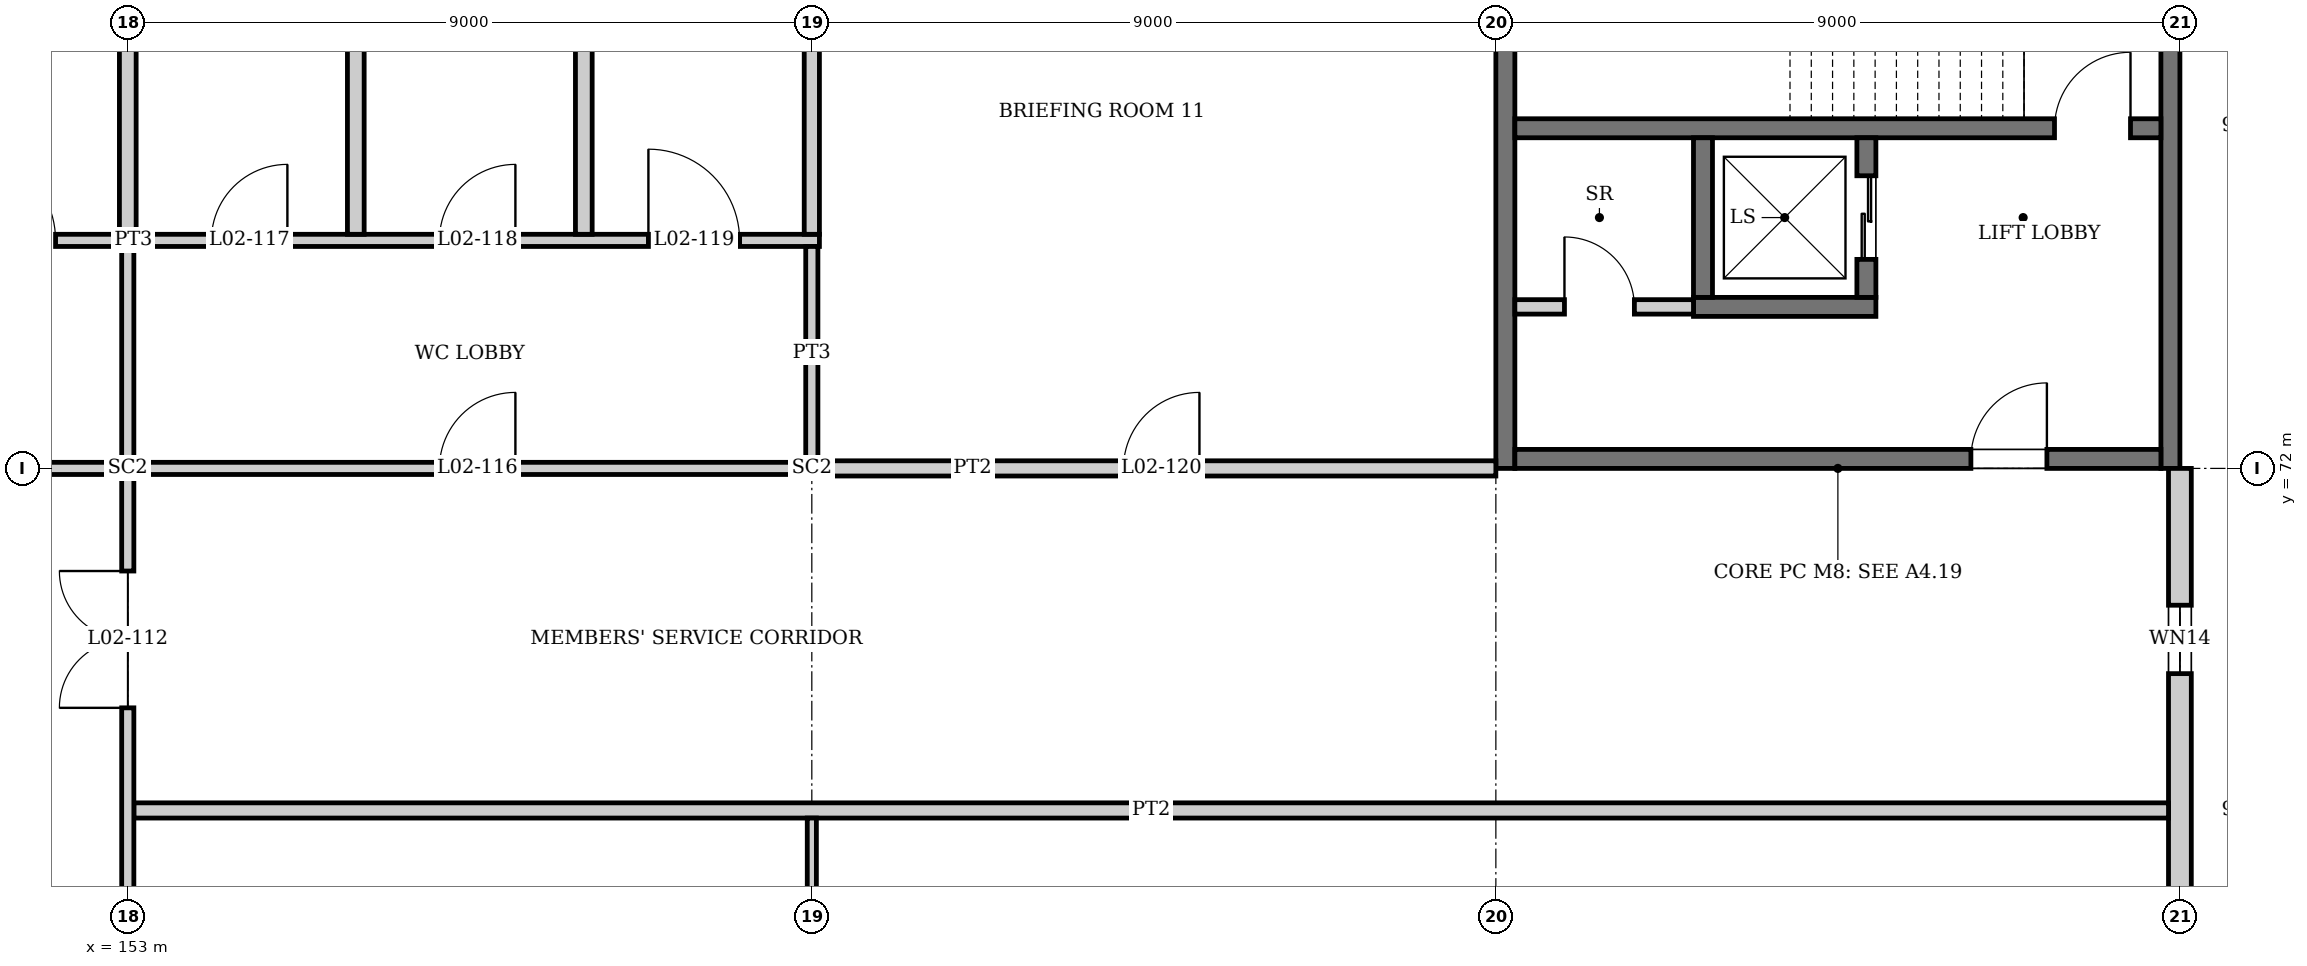
"""IFC4 building model, lengths in metres.
Left out: names, types, materials, properties, quantities, classifications, styles, units other than length and angle.
Written with IfcOpenShell. Run it as: python <this file> out.ifc"""

import sys

from ifc_helpers import new_model, si_unit, direction, frame, frame_2d, origin, origin_2d, place, context, subcontext, project, spatial, rectangle, i_section, extrude, element, fill, save


model = new_model("IFC4")
c1 = context("Model", 3, precision=1e-05, world=origin(), true_north=direction((0.0, 1.0)))
c2 = subcontext(c1, "Body", "Model", "MODEL_VIEW")
j1 = project(units=[si_unit("LENGTHUNIT", "METRE"), si_unit("PLANEANGLEUNIT", "RADIAN")], contexts=[c1])
p1 = place(None, origin())
s1 = spatial("IfcSite", under=j1, at=p1, CompositionType="ELEMENT")
p2 = place(p1, origin())
s2 = spatial("IfcBuilding", under=s1, at=p2, CompositionType="ELEMENT")
p3 = place(p2, frame((0.0, 0.0, 10.5)))
s3 = spatial("IfcBuildingStorey", under=s2, at=p3, CompositionType="ELEMENT", Elevation=10.5)
for number, where, z_axis, x_axis in (
    (1, (153.0, 72.0, 0.0), (0.0, 0.0, 1.0), (0.0, 1.0, 0.0)),
    (2, (162.0, 72.0, 0.0), (0.0, 0.0, 1.0), (0.0, 1.0, 0.0)),
):
    element("IfcColumn", number, at=place(p3, frame(where, z_axis=z_axis, x_axis=x_axis)), inside=s3, PredefinedType="COLUMN", context=c2, shape_type="SweptSolid", body=[
        extrude(i_section(OverallWidth=0.256, OverallDepth=0.26, WebThickness=0.01, FlangeThickness=0.017, at=origin_2d()), origin(), (0.0, 0.0, 1.0), 4.5),
    ])
for number, where, z_axis, x_axis in (
    (3, (171.125, 72.0, 0.0), (0.0, 0.0, 1.0), (0.0, 1.0, 0.0)),
    (4, (179.875, 72.0, 0.0), (0.0, 0.0, 1.0), (0.0, 1.0, 0.0)),
):
    element("IfcWall", number, at=place(p3, frame(where, z_axis=z_axis, x_axis=x_axis)), inside=s3, PredefinedType="SHEAR", context=c2, shape_type="SweptSolid", body=[
        extrude(rectangle(XDim=9.0, YDim=0.25, at=frame_2d((4.5, 0.0))), origin(), (0.0, 0.0, 1.0), 4.35),
    ])
p4 = place(p3, frame((171.25, 72.125, 0.0), z_axis=(0.0, 0.0, 1.0), x_axis=(1.0, 0.0, 0.0)))
e5 = element("IfcWall", 5, at=p4, inside=s3, PredefinedType="SHEAR", context=c2, shape_type="SweptSolid", body=[
    extrude(rectangle(XDim=8.5, YDim=0.25, at=frame_2d((4.25, 0.0))), origin(), (0.0, 0.0, 1.0), 4.35),
])
p5 = place(p4, frame((6.0, 0.0, 0.0)))
e6 = element("IfcOpeningElement", 6, at=p5, cuts=e5, PredefinedType="OPENING", context=c2, shape_type="SweptSolid", body=[
    extrude(rectangle(XDim=1.0, YDim=2.1, at=frame_2d((0.5, 1.05))), frame((0.0, 0.135, 0.0), z_axis=(0.0, -1.0, 0.0), x_axis=(1.0, 0.0, 0.0)), (0.0, 0.0, 1.0), 0.27),
])
p6 = place(p3, frame((180.0, 63.127, 0.0), z_axis=(0.0, 0.0, 1.0), x_axis=(0.0, 1.0, 0.0)))
e7 = element("IfcWall", 7, at=p6, inside=s3, PredefinedType="SOLIDWALL", context=c2, shape_type="SweptSolid", body=[
    extrude(rectangle(XDim=8.873, YDim=0.3, at=frame_2d((4.437, 0.0))), origin(), (0.0, 0.0, 1.0), 3.991),
])
p7 = place(p6, frame((0.998, 0.0, 0.9)))
e8 = element("IfcOpeningElement", 8, at=p7, cuts=e7, PredefinedType="OPENING", context=c2, shape_type="SweptSolid", body=[
    extrude(rectangle(XDim=2.25, YDim=1.8, at=frame_2d((1.125, 0.9))), frame((0.0, 0.16, 0.0), z_axis=(0.0, -1.0, 0.0), x_axis=(1.0, 0.0, 0.0)), (0.0, 0.0, 1.0), 0.32),
])
p8 = place(p6, frame((6.173, 0.0, 0.6)))
e9 = element("IfcOpeningElement", 9, at=p8, cuts=e7, PredefinedType="OPENING", context=c2, shape_type="SweptSolid", body=[
    extrude(rectangle(XDim=0.9, YDim=2.7, at=frame_2d((0.45, 1.35))), frame((0.0, 0.16, 0.0), z_axis=(0.0, -1.0, 0.0), x_axis=(1.0, 0.0, 0.0)), (0.0, 0.0, 1.0), 0.32),
])
p9 = place(p3, frame((179.75, 76.475, 0.0), z_axis=(0.0, 0.0, 1.0), x_axis=(-1.0, 0.0, 0.0)))
e10 = element("IfcWall", 10, at=p9, inside=s3, PredefinedType="SOLIDWALL", context=c2, shape_type="SweptSolid", body=[
    extrude(rectangle(XDim=8.5, YDim=0.25, at=frame_2d((4.25, 0.0))), origin(), (0.0, 0.0, 1.0), 4.35),
])
p10 = place(p9, frame((0.4, 0.0, 0.0)))
e11 = element("IfcOpeningElement", 11, at=p10, cuts=e10, PredefinedType="OPENING", context=c2, shape_type="SweptSolid", body=[
    extrude(rectangle(XDim=1.0, YDim=2.1, at=frame_2d((0.5, 1.05))), frame((0.0, 0.135, 0.0), z_axis=(0.0, -1.0, 0.0), x_axis=(1.0, 0.0, 0.0)), (0.0, 0.0, 1.0), 0.27),
])
p11 = place(p3, frame((173.6, 74.125, 0.0), z_axis=(0.0, 0.0, 1.0), x_axis=(1.0, 0.0, 0.0)))
e12 = element("IfcWall", 12, at=p11, inside=s3, PredefinedType="SOLIDWALL", context=c2, shape_type="SweptSolid", body=[
    extrude(rectangle(XDim=2.4, YDim=0.25, at=frame_2d((1.2, 0.0))), origin(), (0.0, 0.0, 1.0), 4.35),
])
p12 = place(p3, frame((173.725, 74.25, 0.0), z_axis=(0.0, 0.0, 1.0), x_axis=(0.0, 1.0, 0.0)))
e13 = element("IfcWall", 13, at=p12, inside=s3, PredefinedType="SOLIDWALL", context=c2, shape_type="SweptSolid", body=[
    extrude(rectangle(XDim=2.1, YDim=0.25, at=frame_2d((1.05, 0.0))), origin(), (0.0, 0.0, 1.0), 4.35),
])
p13 = place(p3, frame((175.875, 74.25, 0.0), z_axis=(0.0, 0.0, 1.0), x_axis=(0.0, 1.0, 0.0)))
e14 = element("IfcWall", 14, at=p13, inside=s3, PredefinedType="SOLIDWALL", context=c2, shape_type="SweptSolid", body=[
    extrude(rectangle(XDim=2.1, YDim=0.25, at=frame_2d((1.05, 0.0))), origin(), (0.0, 0.0, 1.0), 4.35),
])
p14 = place(p13, frame((0.5, 0.0, 0.0)))
e15 = element("IfcOpeningElement", 15, at=p14, cuts=e14, PredefinedType="OPENING", context=c2, shape_type="SweptSolid", body=[
    extrude(rectangle(XDim=1.1, YDim=2.1, at=frame_2d((0.55, 1.05))), frame((0.0, 0.135, 0.0), z_axis=(0.0, -1.0, 0.0), x_axis=(1.0, 0.0, 0.0)), (0.0, 0.0, 1.0), 0.27),
])
p15 = place(p3, frame((153.08, 67.5, 0.0), z_axis=(0.0, 0.0, 1.0), x_axis=(1.0, 0.0, 0.0)))
e16 = element("IfcWall", 16, at=p15, inside=s3, PredefinedType="PARTITIONING", context=c2, shape_type="SweptSolid", body=[
    extrude(rectangle(XDim=26.77, YDim=0.2, at=frame_2d((13.385, 0.0))), origin(), (0.0, 0.0, 1.0), 3.65),
])
p16 = place(p3, frame((144.0, 72.0, 0.0), z_axis=(0.0, 0.0, 1.0), x_axis=(1.0, 0.0, 0.0)))
e17 = element("IfcWall", 17, at=p16, inside=s3, PredefinedType="PARTITIONING", context=c2, shape_type="SweptSolid", body=[
    extrude(rectangle(XDim=8.87, YDim=0.16, at=frame_2d((4.435, 0.0))), origin(), (0.0, 0.0, 1.0), 3.738),
])
p17 = place(p16, frame((4.1, 0.0, 0.0)))
e18 = element("IfcOpeningElement", 18, at=p17, cuts=e17, PredefinedType="OPENING", context=c2, shape_type="SweptSolid", body=[
    extrude(rectangle(XDim=1.0, YDim=2.1, at=frame_2d((0.5, 1.05))), frame((0.0, 0.09, 0.0), z_axis=(0.0, -1.0, 0.0), x_axis=(1.0, 0.0, 0.0)), (0.0, 0.0, 1.0), 0.18),
])
p18 = place(p3, frame((153.13, 72.0, 0.0), z_axis=(0.0, 0.0, 1.0), x_axis=(1.0, 0.0, 0.0)))
e19 = element("IfcWall", 19, at=p18, inside=s3, PredefinedType="PARTITIONING", context=c2, shape_type="SweptSolid", body=[
    extrude(rectangle(XDim=8.74, YDim=0.16, at=frame_2d((4.37, 0.0))), origin(), (0.0, 0.0, 1.0), 3.738),
])
p19 = place(p18, frame((3.97, 0.0, 0.0)))
e20 = element("IfcOpeningElement", 20, at=p19, cuts=e19, PredefinedType="OPENING", context=c2, shape_type="SweptSolid", body=[
    extrude(rectangle(XDim=1.0, YDim=2.1, at=frame_2d((0.5, 1.05))), frame((0.0, 0.09, 0.0), z_axis=(0.0, -1.0, 0.0), x_axis=(1.0, 0.0, 0.0)), (0.0, 0.0, 1.0), 0.18),
])
p20 = place(p3, frame((162.13, 72.0, 0.0), z_axis=(0.0, 0.0, 1.0), x_axis=(1.0, 0.0, 0.0)))
e21 = element("IfcWall", 21, at=p20, inside=s3, PredefinedType="PARTITIONING", context=c2, shape_type="SweptSolid", body=[
    extrude(rectangle(XDim=8.87, YDim=0.2, at=frame_2d((4.435, 0.0))), origin(), (0.0, 0.0, 1.0), 3.738),
])
p21 = place(p20, frame((3.97, 0.0, 0.0)))
e22 = element("IfcOpeningElement", 22, at=p21, cuts=e21, PredefinedType="OPENING", context=c2, shape_type="SweptSolid", body=[
    extrude(rectangle(XDim=1.0, YDim=2.1, at=frame_2d((0.5, 1.05))), frame((0.0, 0.11, 0.0), z_axis=(0.0, -1.0, 0.0), x_axis=(1.0, 0.0, 0.0)), (0.0, 0.0, 1.0), 0.22),
])
p22 = place(p3, frame((171.25, 74.125, 0.0), z_axis=(0.0, 0.0, 1.0), x_axis=(1.0, 0.0, 0.0)))
e23 = element("IfcWall", 23, at=p22, inside=s3, PredefinedType="PARTITIONING", context=c2, shape_type="SweptSolid", body=[
    extrude(rectangle(XDim=2.35, YDim=0.19, at=frame_2d((1.175, 0.0))), origin(), (0.0, 0.0, 1.0), 4.35),
])
p23 = place(p22, frame((0.653, 0.0, 0.0)))
e24 = element("IfcOpeningElement", 24, at=p23, cuts=e23, PredefinedType="OPENING", context=c2, shape_type="SweptSolid", body=[
    extrude(rectangle(XDim=0.92, YDim=2.1, at=frame_2d((0.46, 1.05))), frame((0.0, 0.105, 0.0), z_axis=(0.0, -1.0, 0.0), x_axis=(1.0, 0.0, 0.0)), (0.0, 0.0, 1.0), 0.21),
])
p24 = place(p3, frame((146.89, 75.0, 0.0), z_axis=(0.0, 0.0, 1.0), x_axis=(1.0, 0.0, 0.0)))
e25 = element("IfcWall", 25, at=p24, inside=s3, PredefinedType="PARTITIONING", context=c2, shape_type="SweptSolid", body=[
    extrude(rectangle(XDim=15.21, YDim=0.16, at=frame_2d((7.605, 0.0))), origin(), (0.0, 0.0, 1.0), 4.043),
])
p25 = place(p24, frame((1.21, 0.0, 0.0)))
e26 = element("IfcOpeningElement", 26, at=p25, cuts=e25, PredefinedType="OPENING", context=c2, shape_type="SweptSolid", body=[
    extrude(rectangle(XDim=1.0, YDim=2.1, at=frame_2d((0.5, 1.05))), frame((0.0, 0.09, 0.0), z_axis=(0.0, -1.0, 0.0), x_axis=(1.0, 0.0, 0.0)), (0.0, 0.0, 1.0), 0.18),
])
p26 = place(p24, frame((3.96, 0.0, 0.0)))
e27 = element("IfcOpeningElement", 27, at=p26, cuts=e25, PredefinedType="OPENING", context=c2, shape_type="SweptSolid", body=[
    extrude(rectangle(XDim=1.2, YDim=2.1, at=frame_2d((0.6, 1.05))), frame((0.0, 0.09, 0.0), z_axis=(0.0, -1.0, 0.0), x_axis=(1.0, 0.0, 0.0)), (0.0, 0.0, 1.0), 0.18),
])
p27 = place(p24, frame((7.21, 0.0, 0.0)))
e28 = element("IfcOpeningElement", 28, at=p27, cuts=e25, PredefinedType="OPENING", context=c2, shape_type="SweptSolid", body=[
    extrude(rectangle(XDim=1.0, YDim=2.1, at=frame_2d((0.5, 1.05))), frame((0.0, 0.09, 0.0), z_axis=(0.0, -1.0, 0.0), x_axis=(1.0, 0.0, 0.0)), (0.0, 0.0, 1.0), 0.18),
])
p28 = place(p24, frame((10.21, 0.0, 0.0)))
e29 = element("IfcOpeningElement", 29, at=p28, cuts=e25, PredefinedType="OPENING", context=c2, shape_type="SweptSolid", body=[
    extrude(rectangle(XDim=1.0, YDim=2.1, at=frame_2d((0.5, 1.05))), frame((0.0, 0.09, 0.0), z_axis=(0.0, -1.0, 0.0), x_axis=(1.0, 0.0, 0.0)), (0.0, 0.0, 1.0), 0.18),
])
p29 = place(p24, frame((12.96, 0.0, 0.0)))
e30 = element("IfcOpeningElement", 30, at=p29, cuts=e25, PredefinedType="OPENING", context=c2, shape_type="SweptSolid", body=[
    extrude(rectangle(XDim=1.2, YDim=2.1, at=frame_2d((0.6, 1.05))), frame((0.0, 0.09, 0.0), z_axis=(0.0, -1.0, 0.0), x_axis=(1.0, 0.0, 0.0)), (0.0, 0.0, 1.0), 0.18),
])
p30 = place(p3, frame((153.0, 54.0, 0.0), z_axis=(0.0, 0.0, 1.0), x_axis=(0.0, 1.0, 0.0)))
e31 = element("IfcWall", 31, at=p30, inside=s3, PredefinedType="PARTITIONING", context=c2, shape_type="SweptSolid", body=[
    extrude(rectangle(XDim=17.87, YDim=0.16, at=frame_2d((8.935, 0.0))), origin(), (0.0, 0.0, 1.0), 3.65),
])
p31 = place(p30, frame((1.35, 0.0, 0.0)))
e32 = element("IfcOpeningElement", 32, at=p31, cuts=e31, PredefinedType="OPENING", context=c2, shape_type="SweptSolid", body=[
    extrude(rectangle(XDim=1.8, YDim=2.1, at=frame_2d((0.9, 1.05))), frame((0.0, 0.09, 0.0), z_axis=(0.0, -1.0, 0.0), x_axis=(1.0, 0.0, 0.0)), (0.0, 0.0, 1.0), 0.18),
])
p32 = place(p30, frame((14.85, 0.0, 0.0)))
e33 = element("IfcOpeningElement", 33, at=p32, cuts=e31, PredefinedType="OPENING", context=c2, shape_type="SweptSolid", body=[
    extrude(rectangle(XDim=1.8, YDim=2.1, at=frame_2d((0.9, 1.05))), frame((0.0, 0.09, 0.0), z_axis=(0.0, -1.0, 0.0), x_axis=(1.0, 0.0, 0.0)), (0.0, 0.0, 1.0), 0.18),
])
p33 = place(p3, frame((153.0, 72.13, 0.0), z_axis=(0.0, 0.0, 1.0), x_axis=(0.0, 1.0, 0.0)))
e34 = element("IfcWall", 34, at=p33, inside=s3, PredefinedType="PARTITIONING", context=c2, shape_type="SweptSolid", body=[
    extrude(rectangle(XDim=2.79, YDim=0.16, at=frame_2d((1.395, 0.0))), origin(), (0.0, 0.0, 1.0), 4.043),
])
p34 = place(p3, frame((153.0, 75.08, 0.0), z_axis=(0.0, 0.0, 1.0), x_axis=(0.0, 1.0, 0.0)))
e35 = element("IfcWall", 35, at=p34, inside=s3, PredefinedType="PLUMBINGWALL", context=c2, shape_type="SweptSolid", body=[
    extrude(rectangle(XDim=5.32, YDim=0.22, at=frame_2d((2.66, 0.0))), origin(), (0.0, 0.0, 1.0), 4.043),
])
for number, where, z_axis, x_axis in (
    (36, (156.0, 75.08, 0.0), (0.0, 0.0, 1.0), (0.0, 1.0, 0.0)),
    (37, (159.0, 75.08, 0.0), (0.0, 0.0, 1.0), (0.0, 1.0, 0.0)),
):
    element("IfcWall", number, at=place(p3, frame(where, z_axis=z_axis, x_axis=x_axis)), inside=s3, PredefinedType="PLUMBINGWALL", context=c2, shape_type="SweptSolid", body=[
        extrude(rectangle(XDim=5.32, YDim=0.22, at=frame_2d((2.66, 0.0))), origin(), (0.0, 0.0, 1.0), 4.35),
    ])
p35 = place(p3, frame((162.0, 58.6, 0.0), z_axis=(0.0, 0.0, 1.0), x_axis=(0.0, 1.0, 0.0)))
e38 = element("IfcWall", 38, at=p35, inside=s3, PredefinedType="PARTITIONING", context=c2, shape_type="SweptSolid", body=[
    extrude(rectangle(XDim=8.8, YDim=0.12, at=frame_2d((4.4, 0.0))), origin(), (0.0, 0.0, 1.0), 3.65),
])
p36 = place(p3, frame((162.0, 72.13, 0.0), z_axis=(0.0, 0.0, 1.0), x_axis=(0.0, 1.0, 0.0)))
e39 = element("IfcWall", 39, at=p36, inside=s3, PredefinedType="PARTITIONING", context=c2, shape_type="SweptSolid", body=[
    extrude(rectangle(XDim=2.79, YDim=0.16, at=frame_2d((1.395, 0.0))), origin(), (0.0, 0.0, 1.0), 4.043),
])
p37 = place(p3, frame((162.0, 75.08, 0.0), z_axis=(0.0, 0.0, 1.0), x_axis=(0.0, 1.0, 0.0)))
e40 = element("IfcWall", 40, at=p37, inside=s3, PredefinedType="PARTITIONING", context=c2, shape_type="SweptSolid", body=[
    extrude(rectangle(XDim=5.32, YDim=0.2, at=frame_2d((2.66, 0.0))), origin(), (0.0, 0.0, 1.0), 4.043),
])
p38 = place(p8, origin())
e41 = element("IfcWindow", 41, at=p38, inside=s3, PartitioningType="SINGLE_PANEL", PredefinedType="WINDOW", context=c2, shape_type="SweptSolid", body=[
    extrude(rectangle(XDim=0.9, YDim=2.7, at=frame_2d((0.45, 1.35))), frame((0.0, 0.03, 0.0), z_axis=(0.0, -1.0, 0.0), x_axis=(1.0, 0.0, 0.0)), (0.0, 0.0, 1.0), 0.06),
])
fill(e9, e41)
p39 = place(p14, origin())
e42 = element("IfcDoor", 42, at=p39, inside=s3, OperationType="DOUBLE_DOOR_SLIDING", PredefinedType="DOOR", context=c2, shape_type="SweptSolid", body=[
    extrude(rectangle(XDim=1.1, YDim=2.1, at=frame_2d((0.55, 1.05))), frame((0.0, 0.025, 0.0), z_axis=(0.0, -1.0, 0.0), x_axis=(1.0, 0.0, 0.0)), (0.0, 0.0, 1.0), 0.05),
])
fill(e15, e42)
p40 = place(p26, origin())
e43 = element("IfcDoor", 43, at=p40, inside=s3, OperationType="SINGLE_SWING_LEFT", PredefinedType="DOOR", context=c2, shape_type="SweptSolid", body=[
    extrude(rectangle(XDim=1.2, YDim=2.1, at=frame_2d((0.6, 1.05))), frame((0.0, 0.025, 0.0), z_axis=(0.0, -1.0, 0.0), x_axis=(1.0, 0.0, 0.0)), (0.0, 0.0, 1.0), 0.05),
])
fill(e27, e43)
p41 = place(p10, frame((1.0, 0.0, 0.0), z_axis=(0.0, 0.0, 1.0), x_axis=(-1.0, 0.0, 0.0)))
e44 = element("IfcDoor", 44, at=p41, inside=s3, OperationType="SINGLE_SWING_RIGHT", PredefinedType="DOOR", context=c2, shape_type="SweptSolid", body=[
    extrude(rectangle(XDim=1.0, YDim=2.1, at=frame_2d((0.5, 1.05))), frame((0.0, 0.025, 0.0), z_axis=(0.0, -1.0, 0.0), x_axis=(1.0, 0.0, 0.0)), (0.0, 0.0, 1.0), 0.05),
])
fill(e11, e44)
p42 = place(p5, origin())
e45 = element("IfcDoor", 45, at=p42, inside=s3, OperationType="SINGLE_SWING_RIGHT", PredefinedType="DOOR", context=c2, shape_type="SweptSolid", body=[
    extrude(rectangle(XDim=1.0, YDim=2.1, at=frame_2d((0.5, 1.05))), frame((0.0, 0.025, 0.0), z_axis=(0.0, -1.0, 0.0), x_axis=(1.0, 0.0, 0.0)), (0.0, 0.0, 1.0), 0.05),
])
fill(e6, e45)
p43 = place(p23, origin())
e46 = element("IfcDoor", 46, at=p43, inside=s3, OperationType="SINGLE_SWING_LEFT", PredefinedType="DOOR", context=c2, shape_type="SweptSolid", body=[
    extrude(rectangle(XDim=0.92, YDim=2.1, at=frame_2d((0.46, 1.05))), frame((0.0, 0.025, 0.0), z_axis=(0.0, -1.0, 0.0), x_axis=(1.0, 0.0, 0.0)), (0.0, 0.0, 1.0), 0.05),
])
fill(e24, e46)
p44 = place(p32, origin())
e47 = element("IfcDoor", 47, at=p44, inside=s3, OperationType="DOUBLE_DOOR_SINGLE_SWING", PredefinedType="DOOR", context=c2, shape_type="SweptSolid", body=[
    extrude(rectangle(XDim=1.8, YDim=2.1, at=frame_2d((0.9, 1.05))), frame((0.0, 0.025, 0.0), z_axis=(0.0, -1.0, 0.0), x_axis=(1.0, 0.0, 0.0)), (0.0, 0.0, 1.0), 0.05),
])
fill(e33, e47)
p45 = place(p19, origin())
e48 = element("IfcDoor", 48, at=p45, inside=s3, OperationType="SINGLE_SWING_RIGHT", PredefinedType="DOOR", context=c2, shape_type="SweptSolid", body=[
    extrude(rectangle(XDim=1.0, YDim=2.1, at=frame_2d((0.5, 1.05))), frame((0.0, 0.025, 0.0), z_axis=(0.0, -1.0, 0.0), x_axis=(1.0, 0.0, 0.0)), (0.0, 0.0, 1.0), 0.05),
])
fill(e20, e48)
p46 = place(p27, origin())
e49 = element("IfcDoor", 49, at=p46, inside=s3, OperationType="SINGLE_SWING_RIGHT", PredefinedType="DOOR", context=c2, shape_type="SweptSolid", body=[
    extrude(rectangle(XDim=1.0, YDim=2.1, at=frame_2d((0.5, 1.05))), frame((0.0, 0.025, 0.0), z_axis=(0.0, -1.0, 0.0), x_axis=(1.0, 0.0, 0.0)), (0.0, 0.0, 1.0), 0.05),
])
fill(e28, e49)
p47 = place(p28, origin())
e50 = element("IfcDoor", 50, at=p47, inside=s3, OperationType="SINGLE_SWING_RIGHT", PredefinedType="DOOR", context=c2, shape_type="SweptSolid", body=[
    extrude(rectangle(XDim=1.0, YDim=2.1, at=frame_2d((0.5, 1.05))), frame((0.0, 0.025, 0.0), z_axis=(0.0, -1.0, 0.0), x_axis=(1.0, 0.0, 0.0)), (0.0, 0.0, 1.0), 0.05),
])
fill(e29, e50)
p48 = place(p29, origin())
e51 = element("IfcDoor", 51, at=p48, inside=s3, OperationType="SINGLE_SWING_LEFT", PredefinedType="DOOR", context=c2, shape_type="SweptSolid", body=[
    extrude(rectangle(XDim=1.2, YDim=2.1, at=frame_2d((0.6, 1.05))), frame((0.0, 0.025, 0.0), z_axis=(0.0, -1.0, 0.0), x_axis=(1.0, 0.0, 0.0)), (0.0, 0.0, 1.0), 0.05),
])
fill(e30, e51)
p49 = place(p21, origin())
e52 = element("IfcDoor", 52, at=p49, inside=s3, OperationType="SINGLE_SWING_RIGHT", PredefinedType="DOOR", context=c2, shape_type="SweptSolid", body=[
    extrude(rectangle(XDim=1.0, YDim=2.1, at=frame_2d((0.5, 1.05))), frame((0.0, 0.025, 0.0), z_axis=(0.0, -1.0, 0.0), x_axis=(1.0, 0.0, 0.0)), (0.0, 0.0, 1.0), 0.05),
])
fill(e22, e52)
save(model, sys.argv[1])
